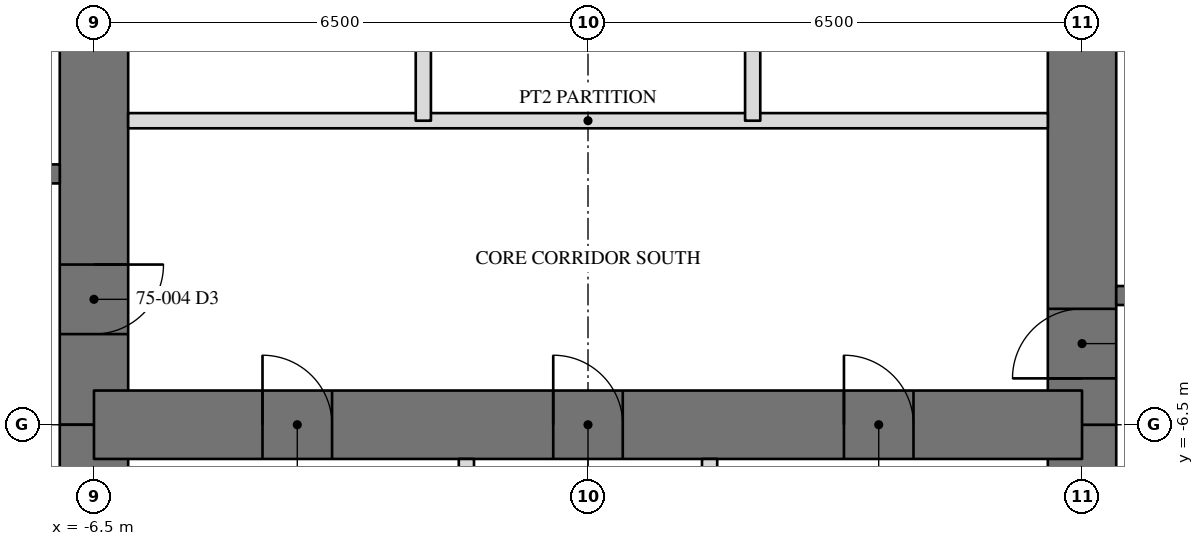
"""IFC4 building model, lengths in metres.
Left out: names, types, materials, properties, quantities, classifications, styles, units other than length and angle.
Written with IfcOpenShell. Run it as: python <this file> out.ifc"""

import sys

from ifc_helpers import new_model, si_unit, direction, frame, frame_2d, origin, place, context, subcontext, project, spatial, rectangle, extrude, element, fill, save


model = new_model("IFC4")
c1 = context("Model", 3, precision=1e-05, world=origin(), true_north=direction((0.0, 1.0)))
c2 = subcontext(c1, "Body", "Model", "MODEL_VIEW")
j1 = project(units=[si_unit("LENGTHUNIT", "METRE"), si_unit("PLANEANGLEUNIT", "RADIAN")], contexts=[c1])
p1 = place(None, origin())
s1 = spatial("IfcSite", under=j1, at=p1, CompositionType="ELEMENT")
p2 = place(p1, origin())
s2 = spatial("IfcBuilding", under=s1, at=p2, CompositionType="ELEMENT")
p3 = place(p2, frame((0.0, 0.0, 304.2)))
s3 = spatial("IfcBuildingStorey", under=s2, at=p3, CompositionType="ELEMENT", Elevation=304.2)
p4 = place(p3, frame((6.5, -11.0, 0.0), z_axis=(0.0, 0.0, 1.0), x_axis=(0.0, 1.0, 0.0)))
e1 = element("IfcWall", 1, at=p4, inside=s3, PredefinedType="SHEAR", context=c2, shape_type="SweptSolid", body=[
    extrude(rectangle(XDim=4.5, YDim=0.9, at=frame_2d((2.25, 0.0))), origin(), (0.0, 0.0, 1.0), 6.0),
])
p5 = place(p3, frame((6.5, -6.5, 0.0), z_axis=(0.0, 0.0, 1.0), x_axis=(0.0, 1.0, 0.0)))
e2 = element("IfcWall", 2, at=p5, inside=s3, PredefinedType="SHEAR", context=c2, shape_type="SweptSolid", body=[
    extrude(rectangle(XDim=13.0, YDim=0.9, at=frame_2d((6.5, 0.0))), origin(), (0.0, 0.0, 1.0), 6.0),
])
p6 = place(p5, frame((10.893, 0.0, 0.0)))
e3 = element("IfcOpeningElement", 3, at=p6, cuts=e2, PredefinedType="OPENING", context=c2, shape_type="SweptSolid", body=[
    extrude(rectangle(XDim=0.915, YDim=2.134, at=frame_2d((0.458, 1.067))), frame((0.0, 0.46, 0.0), z_axis=(0.0, -1.0, 0.0), x_axis=(1.0, 0.0, 0.0)), (0.0, 0.0, 1.0), 0.92),
])
p7 = place(p5, frame((0.61, 0.0, 0.0)))
e4 = element("IfcOpeningElement", 4, at=p7, cuts=e2, PredefinedType="OPENING", context=c2, shape_type="SweptSolid", body=[
    extrude(rectangle(XDim=0.915, YDim=2.134, at=frame_2d((0.458, 1.067))), frame((0.0, 0.46, 0.0), z_axis=(0.0, -1.0, 0.0), x_axis=(1.0, 0.0, 0.0)), (0.0, 0.0, 1.0), 0.92),
])
p8 = place(p3, frame((-6.5, 6.5, 0.0), z_axis=(0.0, 0.0, 1.0), x_axis=(0.0, -1.0, 0.0)))
e5 = element("IfcWall", 5, at=p8, inside=s3, PredefinedType="SHEAR", context=c2, shape_type="SweptSolid", body=[
    extrude(rectangle(XDim=13.0, YDim=0.9, at=frame_2d((6.5, 0.0))), origin(), (0.0, 0.0, 1.0), 6.0),
])
p9 = place(p8, frame((10.893, 0.0, 0.0)))
e6 = element("IfcOpeningElement", 6, at=p9, cuts=e5, PredefinedType="OPENING", context=c2, shape_type="SweptSolid", body=[
    extrude(rectangle(XDim=0.915, YDim=2.134, at=frame_2d((0.458, 1.067))), frame((0.0, 0.46, 0.0), z_axis=(0.0, -1.0, 0.0), x_axis=(1.0, 0.0, 0.0)), (0.0, 0.0, 1.0), 0.92),
])
p10 = place(p8, frame((0.61, 0.0, 0.0)))
e7 = element("IfcOpeningElement", 7, at=p10, cuts=e5, PredefinedType="OPENING", context=c2, shape_type="SweptSolid", body=[
    extrude(rectangle(XDim=0.915, YDim=2.134, at=frame_2d((0.458, 1.067))), frame((0.0, 0.46, 0.0), z_axis=(0.0, -1.0, 0.0), x_axis=(1.0, 0.0, 0.0)), (0.0, 0.0, 1.0), 0.92),
])
p11 = place(p3, frame((-6.5, -6.5, 0.0), z_axis=(0.0, 0.0, 1.0), x_axis=(0.0, -1.0, 0.0)))
e8 = element("IfcWall", 8, at=p11, inside=s3, PredefinedType="SHEAR", context=c2, shape_type="SweptSolid", body=[
    extrude(rectangle(XDim=4.5, YDim=0.9, at=frame_2d((2.25, 0.0))), origin(), (0.0, 0.0, 1.0), 6.0),
])
p12 = place(p3, frame((-6.5, -6.5, 0.0), z_axis=(0.0, 0.0, 1.0), x_axis=(1.0, 0.0, 0.0)))
e9 = element("IfcWall", 9, at=p12, inside=s3, PredefinedType="SHEAR", context=c2, shape_type="SweptSolid", body=[
    extrude(rectangle(XDim=13.0, YDim=0.9, at=frame_2d((6.5, 0.0))), origin(), (0.0, 0.0, 1.0), 6.0),
])
p13 = place(p12, frame((6.042, 0.0, 0.0)))
e10 = element("IfcOpeningElement", 10, at=p13, cuts=e9, PredefinedType="OPENING", context=c2, shape_type="SweptSolid", body=[
    extrude(rectangle(XDim=0.915, YDim=2.134, at=frame_2d((0.458, 1.067))), frame((0.0, 0.46, 0.0), z_axis=(0.0, -1.0, 0.0), x_axis=(1.0, 0.0, 0.0)), (0.0, 0.0, 1.0), 0.92),
])
p14 = place(p12, frame((2.218, 0.0, 0.0)))
e11 = element("IfcOpeningElement", 11, at=p14, cuts=e9, PredefinedType="OPENING", context=c2, shape_type="SweptSolid", body=[
    extrude(rectangle(XDim=0.915, YDim=2.134, at=frame_2d((0.458, 1.067))), frame((0.0, 0.46, 0.0), z_axis=(0.0, -1.0, 0.0), x_axis=(1.0, 0.0, 0.0)), (0.0, 0.0, 1.0), 0.92),
])
p15 = place(p12, frame((9.867, 0.0, 0.0)))
e12 = element("IfcOpeningElement", 12, at=p15, cuts=e9, PredefinedType="OPENING", context=c2, shape_type="SweptSolid", body=[
    extrude(rectangle(XDim=0.915, YDim=2.134, at=frame_2d((0.458, 1.067))), frame((0.0, 0.46, 0.0), z_axis=(0.0, -1.0, 0.0), x_axis=(1.0, 0.0, 0.0)), (0.0, 0.0, 1.0), 0.92),
])
p16 = place(p3, frame((6.95, -4.8, 0.0), z_axis=(0.0, 0.0, 1.0), x_axis=(1.0, 0.0, 0.0)))
e13 = element("IfcWall", 13, at=p16, inside=s3, PredefinedType="SOLIDWALL", context=c2, shape_type="SweptSolid", body=[
    extrude(rectangle(XDim=3.75, YDim=0.25, at=frame_2d((1.875, 0.0))), origin(), (0.0, 0.0, 1.0), 5.81),
])
p17 = place(p3, frame((-6.95, -3.2, 0.0), z_axis=(0.0, 0.0, 1.0), x_axis=(-1.0, 0.0, 0.0)))
e14 = element("IfcWall", 14, at=p17, inside=s3, PredefinedType="SOLIDWALL", context=c2, shape_type="SweptSolid", body=[
    extrude(rectangle(XDim=3.75, YDim=0.25, at=frame_2d((1.875, 0.0))), origin(), (0.0, 0.0, 1.0), 5.81),
])
p18 = place(p17, frame((1.342, 0.0, 0.0)))
e15 = element("IfcOpeningElement", 15, at=p18, cuts=e14, PredefinedType="OPENING", context=c2, shape_type="SweptSolid", body=[
    extrude(rectangle(XDim=1.067, YDim=2.134, at=frame_2d((0.533, 1.067))), frame((0.0, 0.135, 0.0), z_axis=(0.0, -1.0, 0.0), x_axis=(1.0, 0.0, 0.0)), (0.0, 0.0, 1.0), 0.27),
])
p19 = place(p3, frame((6.05, -2.5, 0.0), z_axis=(0.0, 0.0, 1.0), x_axis=(-1.0, 0.0, 0.0)))
e16 = element("IfcWall", 16, at=p19, inside=s3, PredefinedType="PARTITIONING", context=c2, shape_type="SweptSolid", body=[
    extrude(rectangle(XDim=12.1, YDim=0.2, at=frame_2d((6.05, 0.0))), origin(), (0.0, 0.0, 1.0), 5.81),
])
for number, where, z_axis, x_axis in (
    (17, (-2.167, -2.5, 0.0), (0.0, 0.0, 1.0), (0.0, 1.0, 0.0)),
    (18, (2.167, -2.5, 0.0), (0.0, 0.0, 1.0), (0.0, 1.0, 0.0)),
):
    element("IfcWall", number, at=place(p3, frame(where, z_axis=z_axis, x_axis=x_axis)), inside=s3, PredefinedType="PARTITIONING", context=c2, shape_type="SweptSolid", body=[
        extrude(rectangle(XDim=5.0, YDim=0.2, at=frame_2d((2.5, 0.0))), origin(), (0.0, 0.0, 1.0), 5.81),
    ])
for number, where, z_axis, x_axis in (
    (19, (-1.6, -6.95, 0.0), (0.0, 0.0, 1.0), (0.0, -1.0, 0.0)),
    (20, (1.6, -6.95, 0.0), (0.0, 0.0, 1.0), (0.0, -1.0, 0.0)),
):
    element("IfcWall", number, at=place(p3, frame(where, z_axis=z_axis, x_axis=x_axis)), inside=s3, PredefinedType="PARTITIONING", context=c2, shape_type="SweptSolid", body=[
        extrude(rectangle(XDim=3.75, YDim=0.2, at=frame_2d((1.875, 0.0))), origin(), (0.0, 0.0, 1.0), 5.81),
    ])
p20 = place(p9, origin())
e21 = element("IfcDoor", 21, at=p20, inside=s3, OperationType="SINGLE_SWING_RIGHT", PredefinedType="DOOR", context=c2, shape_type="SweptSolid", body=[
    extrude(rectangle(XDim=0.915, YDim=2.134, at=frame_2d((0.458, 1.067))), frame((0.0, -0.375, 0.0), z_axis=(0.0, -1.0, 0.0), x_axis=(1.0, 0.0, 0.0)), (0.0, 0.0, 1.0), 0.05),
])
fill(e6, e21)
p21 = place(p7, origin())
e22 = element("IfcDoor", 22, at=p21, inside=s3, OperationType="SINGLE_SWING_RIGHT", PredefinedType="DOOR", context=c2, shape_type="SweptSolid", body=[
    extrude(rectangle(XDim=0.915, YDim=2.134, at=frame_2d((0.458, 1.067))), frame((0.0, -0.375, 0.0), z_axis=(0.0, -1.0, 0.0), x_axis=(1.0, 0.0, 0.0)), (0.0, 0.0, 1.0), 0.05),
])
fill(e4, e22)
p22 = place(p13, origin())
e23 = element("IfcDoor", 23, at=p22, inside=s3, OperationType="SINGLE_SWING_RIGHT", PredefinedType="DOOR", context=c2, shape_type="SweptSolid", body=[
    extrude(rectangle(XDim=0.915, YDim=2.134, at=frame_2d((0.458, 1.067))), frame((0.0, -0.375, 0.0), z_axis=(0.0, -1.0, 0.0), x_axis=(1.0, 0.0, 0.0)), (0.0, 0.0, 1.0), 0.05),
])
fill(e10, e23)
p23 = place(p14, origin())
e24 = element("IfcDoor", 24, at=p23, inside=s3, OperationType="SINGLE_SWING_RIGHT", PredefinedType="DOOR", context=c2, shape_type="SweptSolid", body=[
    extrude(rectangle(XDim=0.915, YDim=2.134, at=frame_2d((0.458, 1.067))), frame((0.0, -0.375, 0.0), z_axis=(0.0, -1.0, 0.0), x_axis=(1.0, 0.0, 0.0)), (0.0, 0.0, 1.0), 0.05),
])
fill(e11, e24)
p24 = place(p15, origin())
e25 = element("IfcDoor", 25, at=p24, inside=s3, OperationType="SINGLE_SWING_RIGHT", PredefinedType="DOOR", context=c2, shape_type="SweptSolid", body=[
    extrude(rectangle(XDim=0.915, YDim=2.134, at=frame_2d((0.458, 1.067))), frame((0.0, -0.375, 0.0), z_axis=(0.0, -1.0, 0.0), x_axis=(1.0, 0.0, 0.0)), (0.0, 0.0, 1.0), 0.05),
])
fill(e12, e25)
save(model, sys.argv[1])
